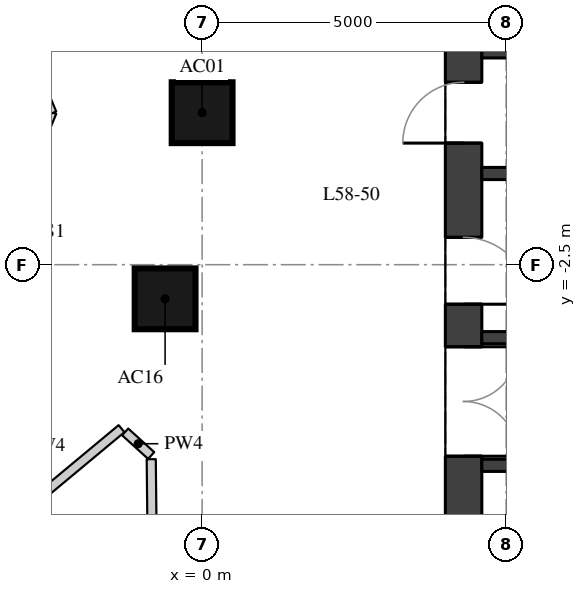
"""IFC4 building model, lengths in metres.
Left out: names, types, materials, properties, quantities, classifications, styles, units other than length and angle.
Written with IfcOpenShell. Run it as: python <this file> out.ifc"""

import sys

from ifc_helpers import new_model, si_unit, direction, frame, frame_2d, origin, origin_2d, place, context, subcontext, project, spatial, rectangle, extrude, element, fill, save


model = new_model("IFC4")
c1 = context("Model", 3, precision=1e-05, world=origin(), true_north=direction((0.0, 1.0)))
c2 = subcontext(c1, "Body", "Model", "MODEL_VIEW")
j1 = project(units=[si_unit("LENGTHUNIT", "METRE"), si_unit("PLANEANGLEUNIT", "RADIAN")], contexts=[c1])
p1 = place(None, origin())
s1 = spatial("IfcSite", under=j1, at=p1, CompositionType="ELEMENT")
p2 = place(p1, origin())
s2 = spatial("IfcBuilding", under=s1, at=p2, CompositionType="ELEMENT")
p3 = place(p2, frame((0.0, 0.0, 205.7)))
s3 = spatial("IfcBuildingStorey", under=s2, at=p3, CompositionType="ELEMENT", Elevation=205.7)
for number, where, z_axis, x_axis in (
    (1, (0.0, 0.0, 0.0), (0.0, 0.0, 1.0), (1.0, 0.0, 0.0)),
    (2, (-0.609, -3.062, 0.0), (0.0, 0.0, 1.0), (1.0, 0.0, 0.0)),
):
    element("IfcColumn", number, at=place(p3, frame(where, z_axis=z_axis, x_axis=x_axis)), inside=s3, PredefinedType="COLUMN", context=c2, shape_type="SweptSolid", body=[
        extrude(rectangle(XDim=1.0, YDim=1.0, at=origin_2d()), origin(), (0.0, 0.0, 1.0), 3.3),
    ])
p4 = place(p3, frame((4.3, -9.4, 0.0), z_axis=(0.0, 0.0, 1.0), x_axis=(0.0, 1.0, 0.0)))
e3 = element("IfcWall", 3, at=p4, inside=s3, PredefinedType="SHEAR", context=c2, shape_type="SweptSolid", body=[
    extrude(rectangle(XDim=18.8, YDim=0.6, at=frame_2d((9.4, 0.0))), origin(), (0.0, 0.0, 1.0), 3.02),
])
p5 = place(p4, frame((0.65, 0.0, 0.0)))
e4 = element("IfcOpeningElement", 4, at=p5, cuts=e3, PredefinedType="OPENING", context=c2, shape_type="SweptSolid", body=[
    extrude(rectangle(XDim=1.5, YDim=2.1, at=frame_2d((0.75, 1.05))), frame((0.0, 0.31, 0.0), z_axis=(0.0, -1.0, 0.0), x_axis=(1.0, 0.0, 0.0)), (0.0, 0.0, 1.0), 0.62),
])
p6 = place(p4, frame((3.75, 0.0, 0.0)))
e5 = element("IfcOpeningElement", 5, at=p6, cuts=e3, PredefinedType="OPENING", context=c2, shape_type="SweptSolid", body=[
    extrude(rectangle(XDim=1.8, YDim=2.1, at=frame_2d((0.9, 1.05))), frame((0.0, 0.31, 0.0), z_axis=(0.0, -1.0, 0.0), x_axis=(1.0, 0.0, 0.0)), (0.0, 0.0, 1.0), 0.62),
])
p7 = place(p4, frame((6.25, 0.0, 0.0)))
e6 = element("IfcOpeningElement", 6, at=p7, cuts=e3, PredefinedType="OPENING", context=c2, shape_type="SweptSolid", body=[
    extrude(rectangle(XDim=1.1, YDim=2.1, at=frame_2d((0.55, 1.05))), frame((0.0, 0.31, 0.0), z_axis=(0.0, -1.0, 0.0), x_axis=(1.0, 0.0, 0.0)), (0.0, 0.0, 1.0), 0.62),
])
p8 = place(p4, frame((8.9, 0.0, 0.0)))
e7 = element("IfcOpeningElement", 7, at=p8, cuts=e3, PredefinedType="OPENING", context=c2, shape_type="SweptSolid", body=[
    extrude(rectangle(XDim=1.0, YDim=2.1, at=frame_2d((0.5, 1.05))), frame((0.0, 0.31, 0.0), z_axis=(0.0, -1.0, 0.0), x_axis=(1.0, 0.0, 0.0)), (0.0, 0.0, 1.0), 0.62),
])
p9 = place(p4, frame((11.45, 0.0, 0.0)))
e8 = element("IfcOpeningElement", 8, at=p9, cuts=e3, PredefinedType="OPENING", context=c2, shape_type="SweptSolid", body=[
    extrude(rectangle(XDim=1.1, YDim=2.1, at=frame_2d((0.55, 1.05))), frame((0.0, 0.31, 0.0), z_axis=(0.0, -1.0, 0.0), x_axis=(1.0, 0.0, 0.0)), (0.0, 0.0, 1.0), 0.62),
])
p10 = place(p4, frame((13.25, 0.0, 0.0)))
e9 = element("IfcOpeningElement", 9, at=p10, cuts=e3, PredefinedType="OPENING", context=c2, shape_type="SweptSolid", body=[
    extrude(rectangle(XDim=1.8, YDim=2.1, at=frame_2d((0.9, 1.05))), frame((0.0, 0.31, 0.0), z_axis=(0.0, -1.0, 0.0), x_axis=(1.0, 0.0, 0.0)), (0.0, 0.0, 1.0), 0.62),
])
p11 = place(p4, frame((16.65, 0.0, 0.0)))
e10 = element("IfcOpeningElement", 10, at=p11, cuts=e3, PredefinedType="OPENING", context=c2, shape_type="SweptSolid", body=[
    extrude(rectangle(XDim=1.5, YDim=2.1, at=frame_2d((0.75, 1.05))), frame((0.0, 0.31, 0.0), z_axis=(0.0, -1.0, 0.0), x_axis=(1.0, 0.0, 0.0)), (0.0, 0.0, 1.0), 0.62),
])
for number, where, z_axis, x_axis in (
    (11, (4.6, 1.0, 0.0), (0.0, 0.0, 1.0), (1.0, 0.0, 0.0)),
    (12, (4.6, -1.0, 0.0), (0.0, 0.0, 1.0), (1.0, 0.0, 0.0)),
):
    element("IfcWall", number, at=place(p3, frame(where, z_axis=z_axis, x_axis=x_axis)), inside=s3, PredefinedType="SHEAR", context=c2, shape_type="SweptSolid", body=[
        extrude(rectangle(XDim=10.8, YDim=0.2, at=frame_2d((5.4, 0.0))), origin(), (0.0, 0.0, 1.0), 3.02),
    ])
p12 = place(p3, frame((4.6, -3.7, 0.0), z_axis=(0.0, 0.0, 1.0), x_axis=(1.0, 0.0, 0.0)))
e13 = element("IfcWall", 13, at=p12, inside=s3, PredefinedType="SHEAR", context=c2, shape_type="SweptSolid", body=[
    extrude(rectangle(XDim=10.8, YDim=0.2, at=frame_2d((5.4, 0.0))), origin(), (0.0, 0.0, 1.0), 3.02),
])
p13 = place(p12, frame((6.6, 0.0, 0.0)))
e14 = element("IfcOpeningElement", 14, at=p13, cuts=e13, PredefinedType="OPENING", context=c2, shape_type="SweptSolid", body=[
    extrude(rectangle(XDim=1.1, YDim=2.1, at=frame_2d((0.55, 1.05))), frame((0.0, 0.11, 0.0), z_axis=(0.0, -1.0, 0.0), x_axis=(1.0, 0.0, 0.0)), (0.0, 0.0, 1.0), 0.22),
])
p14 = place(p12, frame((8.9, 0.0, 0.0)))
e15 = element("IfcOpeningElement", 15, at=p14, cuts=e13, PredefinedType="OPENING", context=c2, shape_type="SweptSolid", body=[
    extrude(rectangle(XDim=1.1, YDim=2.1, at=frame_2d((0.55, 1.05))), frame((0.0, 0.11, 0.0), z_axis=(0.0, -1.0, 0.0), x_axis=(1.0, 0.0, 0.0)), (0.0, 0.0, 1.0), 0.22),
])
p15 = place(p3, frame((4.6, -5.8, 0.0), z_axis=(0.0, 0.0, 1.0), x_axis=(1.0, 0.0, 0.0)))
e16 = element("IfcWall", 16, at=p15, inside=s3, PredefinedType="SHEAR", context=c2, shape_type="SweptSolid", body=[
    extrude(rectangle(XDim=10.8, YDim=0.2, at=frame_2d((5.4, 0.0))), origin(), (0.0, 0.0, 1.0), 3.02),
])
p16 = place(p3, frame((-3.807, -7.262, 0.0), z_axis=(0.0, 0.0, 1.0), x_axis=(0.768654933145, 0.639663656739, 0.0)))
e17 = element("IfcWall", 17, at=p16, inside=s3, PredefinedType="PARTITIONING", context=c2, shape_type="SweptSolid", body=[
    extrude(rectangle(XDim=3.229, YDim=0.15, at=frame_2d((1.615, 0.0))), origin(), (0.0, 0.0, 1.0), 3.02),
])
p17 = place(p3, frame((-1.266, -5.25, 0.0), z_axis=(0.0, 0.0, 1.0), x_axis=(0.740704364941, -0.671831112525, 0.0)))
e18 = element("IfcWall", 18, at=p17, inside=s3, PredefinedType="PARTITIONING", context=c2, shape_type="SweptSolid", body=[
    extrude(rectangle(XDim=0.578, YDim=0.15, at=frame_2d((0.289, 0.0))), origin(), (0.0, 0.0, 1.0), 3.02),
])
p18 = place(p3, frame((-0.837, -5.699, 0.0), z_axis=(0.0, 0.0, 1.0), x_axis=(0.010681337428, -0.999942952888, 0.0)))
e19 = element("IfcWall", 19, at=p18, inside=s3, PredefinedType="PARTITIONING", context=c2, shape_type="SweptSolid", body=[
    extrude(rectangle(XDim=3.451, YDim=0.15, at=frame_2d((1.726, 0.0))), origin(), (0.0, 0.0, 1.0), 3.02),
])
for number, where, z_axis, x_axis in (
    (20, (-2.446, 0.0, 0.0), (0.0, 0.0, 1.0), (-0.383, -0.924, 0.0)),
    (21, (-4.073, 3.927, 0.0), (0.0, 0.0, 1.0), (0.383, -0.924, 0.0)),
):
    element("IfcWall", number, at=place(p3, frame(where, z_axis=z_axis, x_axis=x_axis)), inside=s3, PredefinedType="PARTITIONING", context=c2, shape_type="SweptSolid", body=[
        extrude(rectangle(XDim=4.251, YDim=0.1, at=frame_2d((2.125, 0.0))), origin(), (0.0, 0.0, 1.0), 3.02),
    ])
p19 = place(p6, origin())
e22 = element("IfcDoor", 22, at=p19, inside=s3, OperationType="DOUBLE_DOOR_SINGLE_SWING", PredefinedType="DOOR", context=c2, shape_type="SweptSolid", body=[
    extrude(rectangle(XDim=1.8, YDim=2.1, at=frame_2d((0.9, 1.05))), frame((0.0, 0.025, 0.0), z_axis=(0.0, -1.0, 0.0), x_axis=(1.0, 0.0, 0.0)), (0.0, 0.0, 1.0), 0.05),
])
fill(e5, e22)
p20 = place(p7, origin())
e23 = element("IfcDoor", 23, at=p20, inside=s3, OperationType="SINGLE_SWING_RIGHT", PredefinedType="DOOR", context=c2, shape_type="SweptSolid", body=[
    extrude(rectangle(XDim=1.1, YDim=2.1, at=frame_2d((0.55, 1.05))), frame((0.0, 0.025, 0.0), z_axis=(0.0, -1.0, 0.0), x_axis=(1.0, 0.0, 0.0)), (0.0, 0.0, 1.0), 0.05),
])
fill(e6, e23)
p21 = place(p8, origin())
e24 = element("IfcDoor", 24, at=p21, inside=s3, OperationType="SINGLE_SWING_LEFT", PredefinedType="DOOR", context=c2, shape_type="SweptSolid", body=[
    extrude(rectangle(XDim=1.0, YDim=2.1, at=frame_2d((0.5, 1.05))), frame((0.0, 0.025, 0.0), z_axis=(0.0, -1.0, 0.0), x_axis=(1.0, 0.0, 0.0)), (0.0, 0.0, 1.0), 0.05),
])
fill(e7, e24)
save(model, sys.argv[1])
